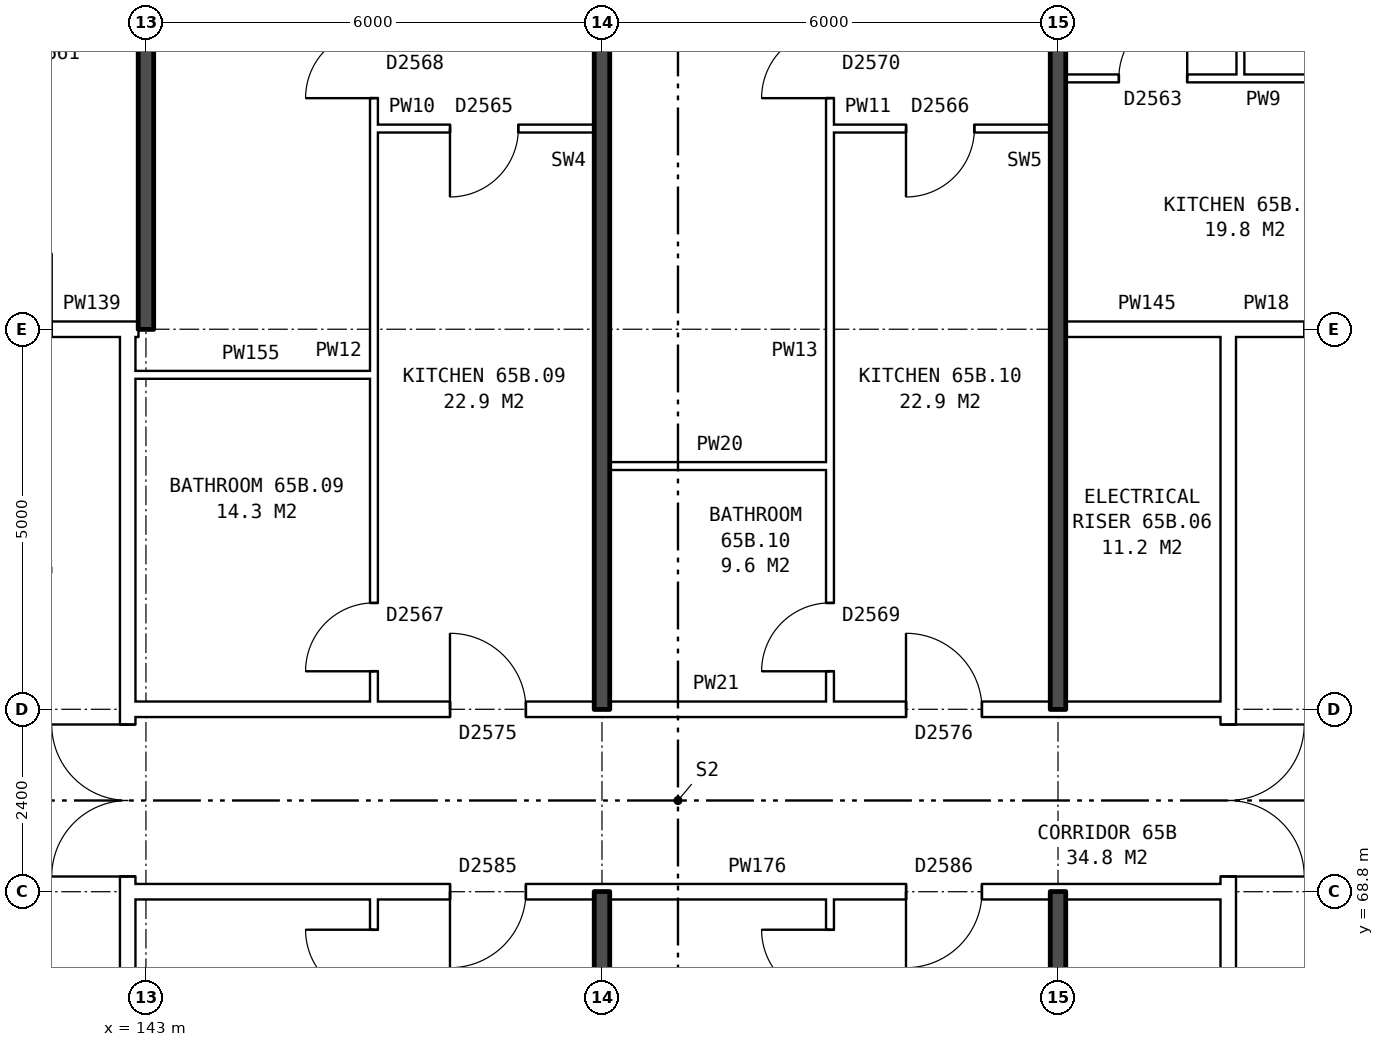
"""IFC4 building model, lengths in metres.
Left out: names, types, materials, properties, quantities, classifications, styles, units other than length and angle.
Written with IfcOpenShell. Run it as: python <this file> out.ifc"""

import sys

from ifc_helpers import new_model, si_unit, direction, frame, frame_2d, origin, place, context, subcontext, project, spatial, rectangle, extrude, element, fill, save


model = new_model("IFC4")
c1 = context("Model", 3, precision=1e-05, world=origin(), true_north=direction((0.0, 1.0)))
c2 = subcontext(c1, "Body", "Model", "MODEL_VIEW")
j1 = project(units=[si_unit("LENGTHUNIT", "METRE"), si_unit("PLANEANGLEUNIT", "RADIAN")], contexts=[c1])
p1 = place(None, origin())
s1 = spatial("IfcSite", under=j1, at=p1, CompositionType="ELEMENT")
p2 = place(p1, origin())
s2 = spatial("IfcBuilding", under=s1, at=p2, CompositionType="ELEMENT")
p3 = place(p2, frame((0.0, 0.0, 230.7)))
s3 = spatial("IfcBuildingStorey", under=s2, at=p3, CompositionType="ELEMENT", Elevation=230.7)
p4 = place(p3, frame((142.76, 63.9, 0.0), z_axis=(0.0, 0.0, 1.0), x_axis=(0.0, 1.0, 0.0)))
e1 = element("IfcWall", 1, at=p4, inside=s3, PredefinedType="PARTITIONING", context=c2, shape_type="SweptSolid", body=[
    extrude(rectangle(XDim=12.2, YDim=0.2, at=frame_2d((6.1, 0.0))), origin(), (0.0, 0.0, 1.0), 2.85),
])
p5 = place(p4, frame((5.1, 0.0, 0.0)))
e2 = element("IfcOpeningElement", 2, at=p5, cuts=e1, PredefinedType="OPENING", context=c2, shape_type="SweptSolid", body=[
    extrude(rectangle(XDim=2.0, YDim=2.1, at=frame_2d((1.0, 1.05))), frame((0.0, 0.11, 0.0), z_axis=(0.0, -1.0, 0.0), x_axis=(1.0, 0.0, 0.0)), (0.0, 0.0, 1.0), 0.22),
])
p6 = place(p3, frame((157.24, 63.9, 0.0), z_axis=(0.0, 0.0, 1.0), x_axis=(0.0, 1.0, 0.0)))
e3 = element("IfcWall", 3, at=p6, inside=s3, PredefinedType="PARTITIONING", context=c2, shape_type="SweptSolid", body=[
    extrude(rectangle(XDim=12.2, YDim=0.2, at=frame_2d((6.1, 0.0))), origin(), (0.0, 0.0, 1.0), 2.85),
])
p7 = place(p6, frame((5.1, 0.0, 0.0)))
e4 = element("IfcOpeningElement", 4, at=p7, cuts=e3, PredefinedType="OPENING", context=c2, shape_type="SweptSolid", body=[
    extrude(rectangle(XDim=2.0, YDim=2.1, at=frame_2d((1.0, 1.05))), frame((0.0, 0.11, 0.0), z_axis=(0.0, -1.0, 0.0), x_axis=(1.0, 0.0, 0.0)), (0.0, 0.0, 1.0), 0.22),
])
p8 = place(p3, frame((142.76, 68.8, 0.0), z_axis=(0.0, 0.0, 1.0), x_axis=(1.0, 0.0, 0.0)))
e5 = element("IfcWall", 5, at=p8, inside=s3, PredefinedType="PARTITIONING", context=c2, shape_type="SweptSolid", body=[
    extrude(rectangle(XDim=14.48, YDim=0.2, at=frame_2d((7.24, 0.0))), origin(), (0.0, 0.0, 1.0), 2.85),
])
p9 = place(p8, frame((4.24, 0.0, 0.0)))
e6 = element("IfcOpeningElement", 6, at=p9, cuts=e5, PredefinedType="OPENING", context=c2, shape_type="SweptSolid", body=[
    extrude(rectangle(XDim=1.0, YDim=2.1, at=frame_2d((0.5, 1.05))), frame((0.0, 0.11, 0.0), z_axis=(0.0, -1.0, 0.0), x_axis=(1.0, 0.0, 0.0)), (0.0, 0.0, 1.0), 0.22),
])
p10 = place(p8, frame((10.24, 0.0, 0.0)))
e7 = element("IfcOpeningElement", 7, at=p10, cuts=e5, PredefinedType="OPENING", context=c2, shape_type="SweptSolid", body=[
    extrude(rectangle(XDim=1.0, YDim=2.1, at=frame_2d((0.5, 1.05))), frame((0.0, 0.11, 0.0), z_axis=(0.0, -1.0, 0.0), x_axis=(1.0, 0.0, 0.0)), (0.0, 0.0, 1.0), 0.22),
])
p11 = place(p3, frame((142.76, 71.2, 0.0), z_axis=(0.0, 0.0, 1.0), x_axis=(1.0, 0.0, 0.0)))
e8 = element("IfcWall", 8, at=p11, inside=s3, PredefinedType="PARTITIONING", context=c2, shape_type="SweptSolid", body=[
    extrude(rectangle(XDim=14.48, YDim=0.2, at=frame_2d((7.24, 0.0))), origin(), (0.0, 0.0, 1.0), 2.85),
])
p12 = place(p11, frame((4.24, 0.0, 0.0)))
e9 = element("IfcOpeningElement", 9, at=p12, cuts=e8, PredefinedType="OPENING", context=c2, shape_type="SweptSolid", body=[
    extrude(rectangle(XDim=1.0, YDim=2.1, at=frame_2d((0.5, 1.05))), frame((0.0, 0.11, 0.0), z_axis=(0.0, -1.0, 0.0), x_axis=(1.0, 0.0, 0.0)), (0.0, 0.0, 1.0), 0.22),
])
p13 = place(p11, frame((10.24, 0.0, 0.0)))
e10 = element("IfcOpeningElement", 10, at=p13, cuts=e8, PredefinedType="OPENING", context=c2, shape_type="SweptSolid", body=[
    extrude(rectangle(XDim=1.0, YDim=2.1, at=frame_2d((0.5, 1.05))), frame((0.0, 0.11, 0.0), z_axis=(0.0, -1.0, 0.0), x_axis=(1.0, 0.0, 0.0)), (0.0, 0.0, 1.0), 0.22),
])
p14 = place(p3, frame((149.1, 74.4, 0.0), z_axis=(0.0, 0.0, 1.0), x_axis=(1.0, 0.0, 0.0)))
e11 = element("IfcWall", 11, at=p14, inside=s3, PredefinedType="PARTITIONING", context=c2, shape_type="SweptSolid", body=[
    extrude(rectangle(XDim=2.9, YDim=0.1, at=frame_2d((1.45, 0.0))), origin(), (0.0, 0.0, 1.0), 2.85),
])
p15 = place(p3, frame((142.76, 75.6, 0.0), z_axis=(0.0, 0.0, 1.0), x_axis=(1.0, 0.0, 0.0)))
e12 = element("IfcWall", 12, at=p15, inside=s3, PredefinedType="PARTITIONING", context=c2, shape_type="SweptSolid", body=[
    extrude(rectangle(XDim=3.24, YDim=0.1, at=frame_2d((1.62, 0.0))), origin(), (0.0, 0.0, 1.0), 2.85),
])
p16 = place(p3, frame((139.76, 76.2, 0.0), z_axis=(0.0, 0.0, 1.0), x_axis=(1.0, 0.0, 0.0)))
e13 = element("IfcWall", 13, at=p16, inside=s3, PredefinedType="PARTITIONING", context=c2, shape_type="SweptSolid", body=[
    extrude(rectangle(XDim=3.0, YDim=0.2, at=frame_2d((1.5, 0.0))), origin(), (0.0, 0.0, 1.0), 2.85),
])
p17 = place(p16, frame((1.0, 0.0, 0.0)))
e14 = element("IfcOpeningElement", 14, at=p17, cuts=e13, PredefinedType="OPENING", context=c2, shape_type="SweptSolid", body=[
    extrude(rectangle(XDim=1.0, YDim=2.1, at=frame_2d((0.5, 1.05))), frame((0.0, 0.11, 0.0), z_axis=(0.0, -1.0, 0.0), x_axis=(1.0, 0.0, 0.0)), (0.0, 0.0, 1.0), 0.22),
])
p18 = place(p3, frame((142.76, 76.2, 0.0), z_axis=(0.0, 0.0, 1.0), x_axis=(1.0, 0.0, 0.0)))
e15 = element("IfcWall", 15, at=p18, inside=s3, PredefinedType="PARTITIONING", context=c2, shape_type="SweptSolid", body=[
    extrude(rectangle(XDim=0.14, YDim=0.2, at=frame_2d((0.07, 0.0))), origin(), (0.0, 0.0, 1.0), 2.85),
])
p19 = place(p3, frame((155.1, 76.2, 0.0), z_axis=(0.0, 0.0, 1.0), x_axis=(1.0, 0.0, 0.0)))
e16 = element("IfcWall", 16, at=p19, inside=s3, PredefinedType="PARTITIONING", context=c2, shape_type="SweptSolid", body=[
    extrude(rectangle(XDim=2.14, YDim=0.2, at=frame_2d((1.07, 0.0))), origin(), (0.0, 0.0, 1.0), 2.85),
])
p20 = place(p3, frame((157.24, 76.2, 0.0), z_axis=(0.0, 0.0, 1.0), x_axis=(1.0, 0.0, 0.0)))
e17 = element("IfcWall", 17, at=p20, inside=s3, PredefinedType="PARTITIONING", context=c2, shape_type="SweptSolid", body=[
    extrude(rectangle(XDim=3.0, YDim=0.2, at=frame_2d((1.5, 0.0))), origin(), (0.0, 0.0, 1.0), 2.85),
])
p21 = place(p20, frame((1.0, 0.0, 0.0)))
e18 = element("IfcOpeningElement", 18, at=p21, cuts=e17, PredefinedType="OPENING", context=c2, shape_type="SweptSolid", body=[
    extrude(rectangle(XDim=1.0, YDim=2.1, at=frame_2d((0.5, 1.05))), frame((0.0, 0.11, 0.0), z_axis=(0.0, -1.0, 0.0), x_axis=(1.0, 0.0, 0.0)), (0.0, 0.0, 1.0), 0.22),
])
p22 = place(p3, frame((146.0, 78.84, 0.0), z_axis=(0.0, 0.0, 1.0), x_axis=(1.0, 0.0, 0.0)))
e19 = element("IfcWall", 19, at=p22, inside=s3, PredefinedType="PARTITIONING", context=c2, shape_type="SweptSolid", body=[
    extrude(rectangle(XDim=2.9, YDim=0.1, at=frame_2d((1.45, 0.0))), origin(), (0.0, 0.0, 1.0), 2.85),
])
p23 = place(p22, frame((1.0, 0.0, 0.0)))
e20 = element("IfcOpeningElement", 20, at=p23, cuts=e19, PredefinedType="OPENING", context=c2, shape_type="SweptSolid", body=[
    extrude(rectangle(XDim=0.9, YDim=2.1, at=frame_2d((0.45, 1.05))), frame((0.0, 0.06, 0.0), z_axis=(0.0, -1.0, 0.0), x_axis=(1.0, 0.0, 0.0)), (0.0, 0.0, 1.0), 0.12),
])
p24 = place(p3, frame((152.0, 78.84, 0.0), z_axis=(0.0, 0.0, 1.0), x_axis=(1.0, 0.0, 0.0)))
e21 = element("IfcWall", 21, at=p24, inside=s3, PredefinedType="PARTITIONING", context=c2, shape_type="SweptSolid", body=[
    extrude(rectangle(XDim=2.9, YDim=0.1, at=frame_2d((1.45, 0.0))), origin(), (0.0, 0.0, 1.0), 2.85),
])
p25 = place(p24, frame((1.0, 0.0, 0.0)))
e22 = element("IfcOpeningElement", 22, at=p25, cuts=e21, PredefinedType="OPENING", context=c2, shape_type="SweptSolid", body=[
    extrude(rectangle(XDim=0.9, YDim=2.1, at=frame_2d((0.45, 1.05))), frame((0.0, 0.06, 0.0), z_axis=(0.0, -1.0, 0.0), x_axis=(1.0, 0.0, 0.0)), (0.0, 0.0, 1.0), 0.12),
])
p26 = place(p3, frame((155.1, 79.5, 0.0), z_axis=(0.0, 0.0, 1.0), x_axis=(1.0, 0.0, 0.0)))
e23 = element("IfcWall", 23, at=p26, inside=s3, PredefinedType="PARTITIONING", context=c2, shape_type="SweptSolid", body=[
    extrude(rectangle(XDim=5.8, YDim=0.1, at=frame_2d((2.9, 0.0))), origin(), (0.0, 0.0, 1.0), 2.85),
])
p27 = place(p26, frame((3.6, 0.0, 0.0)))
e24 = element("IfcOpeningElement", 24, at=p27, cuts=e23, PredefinedType="OPENING", context=c2, shape_type="SweptSolid", body=[
    extrude(rectangle(XDim=0.9, YDim=2.1, at=frame_2d((0.45, 1.05))), frame((0.0, 0.06, 0.0), z_axis=(0.0, -1.0, 0.0), x_axis=(1.0, 0.0, 0.0)), (0.0, 0.0, 1.0), 0.12),
])
p28 = place(p26, frame((0.7, 0.0, 0.0)))
e25 = element("IfcOpeningElement", 25, at=p28, cuts=e23, PredefinedType="OPENING", context=c2, shape_type="SweptSolid", body=[
    extrude(rectangle(XDim=0.9, YDim=2.1, at=frame_2d((0.45, 1.05))), frame((0.0, 0.06, 0.0), z_axis=(0.0, -1.0, 0.0), x_axis=(1.0, 0.0, 0.0)), (0.0, 0.0, 1.0), 0.12),
])
p29 = place(p3, frame((143.0, 76.2, 0.0), z_axis=(0.0, 0.0, 1.0), x_axis=(0.0, 1.0, 0.0)))
e26 = element("IfcWall", 26, at=p29, inside=s3, PredefinedType="SOLIDWALL", context=c2, shape_type="SweptSolid", body=[
    extrude(rectangle(XDim=9.44, YDim=0.2, at=frame_2d((4.72, 0.0))), origin(), (0.0, 0.0, 1.0), 2.85),
])
p30 = place(p3, frame((146.0, 54.36, 0.0), z_axis=(0.0, 0.0, 1.0), x_axis=(0.0, 1.0, 0.0)))
e27 = element("IfcWall", 27, at=p30, inside=s3, PredefinedType="PARTITIONING", context=c2, shape_type="SweptSolid", body=[
    extrude(rectangle(XDim=14.34, YDim=0.1, at=frame_2d((7.17, 0.0))), origin(), (0.0, 0.0, 1.0), 2.85),
])
p31 = place(p30, frame((7.7, 0.0, 0.0)))
e28 = element("IfcOpeningElement", 28, at=p31, cuts=e27, PredefinedType="OPENING", context=c2, shape_type="SweptSolid", body=[
    extrude(rectangle(XDim=0.9, YDim=2.1, at=frame_2d((0.45, 1.05))), frame((0.0, 0.06, 0.0), z_axis=(0.0, -1.0, 0.0), x_axis=(1.0, 0.0, 0.0)), (0.0, 0.0, 1.0), 0.12),
])
p32 = place(p30, frame((13.04, 0.0, 0.0)))
e29 = element("IfcOpeningElement", 29, at=p32, cuts=e27, PredefinedType="OPENING", context=c2, shape_type="SweptSolid", body=[
    extrude(rectangle(XDim=0.9, YDim=2.1, at=frame_2d((0.45, 1.05))), frame((0.0, 0.06, 0.0), z_axis=(0.0, -1.0, 0.0), x_axis=(1.0, 0.0, 0.0)), (0.0, 0.0, 1.0), 0.12),
])
p33 = place(p3, frame((146.0, 71.3, 0.0), z_axis=(0.0, 0.0, 1.0), x_axis=(0.0, 1.0, 0.0)))
e30 = element("IfcWall", 30, at=p33, inside=s3, PredefinedType="PARTITIONING", context=c2, shape_type="SweptSolid", body=[
    extrude(rectangle(XDim=14.34, YDim=0.1, at=frame_2d((7.17, 0.0))), origin(), (0.0, 0.0, 1.0), 2.85),
])
p34 = place(p33, frame((7.94, 0.0, 0.0)))
e31 = element("IfcOpeningElement", 31, at=p34, cuts=e30, PredefinedType="OPENING", context=c2, shape_type="SweptSolid", body=[
    extrude(rectangle(XDim=0.9, YDim=2.1, at=frame_2d((0.45, 1.05))), frame((0.0, 0.06, 0.0), z_axis=(0.0, -1.0, 0.0), x_axis=(1.0, 0.0, 0.0)), (0.0, 0.0, 1.0), 0.12),
])
p35 = place(p33, frame((0.4, 0.0, 0.0)))
e32 = element("IfcOpeningElement", 32, at=p35, cuts=e30, PredefinedType="OPENING", context=c2, shape_type="SweptSolid", body=[
    extrude(rectangle(XDim=0.9, YDim=2.1, at=frame_2d((0.45, 1.05))), frame((0.0, 0.06, 0.0), z_axis=(0.0, -1.0, 0.0), x_axis=(1.0, 0.0, 0.0)), (0.0, 0.0, 1.0), 0.12),
])
for number, where, z_axis, x_axis in (
    (33, (149.0, 54.36, 0.0), (0.0, 0.0, 1.0), (0.0, 1.0, 0.0)),
    (34, (149.0, 71.2, 0.0), (0.0, 0.0, 1.0), (0.0, 1.0, 0.0)),
):
    element("IfcWall", number, at=place(p3, frame(where, z_axis=z_axis, x_axis=x_axis)), inside=s3, PredefinedType="SOLIDWALL", context=c2, shape_type="SweptSolid", body=[
        extrude(rectangle(XDim=14.44, YDim=0.2, at=frame_2d((7.22, 0.0))), origin(), (0.0, 0.0, 1.0), 2.85),
    ])
p36 = place(p3, frame((152.0, 54.36, 0.0), z_axis=(0.0, 0.0, 1.0), x_axis=(0.0, 1.0, 0.0)))
e35 = element("IfcWall", 35, at=p36, inside=s3, PredefinedType="PARTITIONING", context=c2, shape_type="SweptSolid", body=[
    extrude(rectangle(XDim=14.34, YDim=0.1, at=frame_2d((7.17, 0.0))), origin(), (0.0, 0.0, 1.0), 2.85),
])
p37 = place(p36, frame((4.2, 0.0, 0.0)))
e36 = element("IfcOpeningElement", 36, at=p37, cuts=e35, PredefinedType="OPENING", context=c2, shape_type="SweptSolid", body=[
    extrude(rectangle(XDim=0.9, YDim=2.1, at=frame_2d((0.45, 1.05))), frame((0.0, 0.06, 0.0), z_axis=(0.0, -1.0, 0.0), x_axis=(1.0, 0.0, 0.0)), (0.0, 0.0, 1.0), 0.12),
])
p38 = place(p36, frame((13.04, 0.0, 0.0)))
e37 = element("IfcOpeningElement", 37, at=p38, cuts=e35, PredefinedType="OPENING", context=c2, shape_type="SweptSolid", body=[
    extrude(rectangle(XDim=0.9, YDim=2.1, at=frame_2d((0.45, 1.05))), frame((0.0, 0.06, 0.0), z_axis=(0.0, -1.0, 0.0), x_axis=(1.0, 0.0, 0.0)), (0.0, 0.0, 1.0), 0.12),
])
p39 = place(p3, frame((152.0, 71.3, 0.0), z_axis=(0.0, 0.0, 1.0), x_axis=(0.0, 1.0, 0.0)))
e38 = element("IfcWall", 38, at=p39, inside=s3, PredefinedType="PARTITIONING", context=c2, shape_type="SweptSolid", body=[
    extrude(rectangle(XDim=14.34, YDim=0.1, at=frame_2d((7.17, 0.0))), origin(), (0.0, 0.0, 1.0), 2.85),
])
p40 = place(p39, frame((7.94, 0.0, 0.0)))
e39 = element("IfcOpeningElement", 39, at=p40, cuts=e38, PredefinedType="OPENING", context=c2, shape_type="SweptSolid", body=[
    extrude(rectangle(XDim=0.9, YDim=2.1, at=frame_2d((0.45, 1.05))), frame((0.0, 0.06, 0.0), z_axis=(0.0, -1.0, 0.0), x_axis=(1.0, 0.0, 0.0)), (0.0, 0.0, 1.0), 0.12),
])
p41 = place(p39, frame((0.4, 0.0, 0.0)))
e40 = element("IfcOpeningElement", 40, at=p41, cuts=e38, PredefinedType="OPENING", context=c2, shape_type="SweptSolid", body=[
    extrude(rectangle(XDim=0.9, YDim=2.1, at=frame_2d((0.45, 1.05))), frame((0.0, 0.06, 0.0), z_axis=(0.0, -1.0, 0.0), x_axis=(1.0, 0.0, 0.0)), (0.0, 0.0, 1.0), 0.12),
])
for number, where, z_axis, x_axis in (
    (41, (155.0, 54.36, 0.0), (0.0, 0.0, 1.0), (0.0, 1.0, 0.0)),
    (42, (155.0, 71.2, 0.0), (0.0, 0.0, 1.0), (0.0, 1.0, 0.0)),
):
    element("IfcWall", number, at=place(p3, frame(where, z_axis=z_axis, x_axis=x_axis)), inside=s3, PredefinedType="SOLIDWALL", context=c2, shape_type="SweptSolid", body=[
        extrude(rectangle(XDim=14.44, YDim=0.2, at=frame_2d((7.22, 0.0))), origin(), (0.0, 0.0, 1.0), 2.85),
    ])
p42 = place(p3, frame((157.4, 79.55, 0.0), z_axis=(0.0, 0.0, 1.0), x_axis=(0.0, 1.0, 0.0)))
e43 = element("IfcWall", 43, at=p42, inside=s3, PredefinedType="PARTITIONING", context=c2, shape_type="SweptSolid", body=[
    extrude(rectangle(XDim=2.7, YDim=0.1, at=frame_2d((1.35, 0.0))), origin(), (0.0, 0.0, 1.0), 2.85),
])
p43 = place(p5, origin())
e44 = element("IfcDoor", 44, at=p43, inside=s3, OperationType="DOUBLE_DOOR_SINGLE_SWING", PredefinedType="DOOR", context=c2, shape_type="SweptSolid", body=[
    extrude(rectangle(XDim=2.0, YDim=2.1, at=frame_2d((1.0, 1.05))), frame((0.0, 0.025, 0.0), z_axis=(0.0, -1.0, 0.0), x_axis=(1.0, 0.0, 0.0)), (0.0, 0.0, 1.0), 0.05),
])
fill(e2, e44)
p44 = place(p7, frame((2.0, 0.0, 0.0), z_axis=(0.0, 0.0, 1.0), x_axis=(-1.0, 0.0, 0.0)))
e45 = element("IfcDoor", 45, at=p44, inside=s3, OperationType="DOUBLE_DOOR_SINGLE_SWING", PredefinedType="DOOR", context=c2, shape_type="SweptSolid", body=[
    extrude(rectangle(XDim=2.0, YDim=2.1, at=frame_2d((1.0, 1.05))), frame((0.0, 0.025, 0.0), z_axis=(0.0, -1.0, 0.0), x_axis=(1.0, 0.0, 0.0)), (0.0, 0.0, 1.0), 0.05),
])
fill(e4, e45)
p45 = place(p28, origin())
e46 = element("IfcDoor", 46, at=p45, inside=s3, OperationType="SINGLE_SWING_RIGHT", PredefinedType="DOOR", context=c2, shape_type="SweptSolid", body=[
    extrude(rectangle(XDim=0.9, YDim=2.1, at=frame_2d((0.45, 1.05))), frame((0.0, 0.025, 0.0), z_axis=(0.0, -1.0, 0.0), x_axis=(1.0, 0.0, 0.0)), (0.0, 0.0, 1.0), 0.05),
])
fill(e25, e46)
p46 = place(p9, frame((1.0, 0.0, 0.0), z_axis=(0.0, 0.0, 1.0), x_axis=(-1.0, 0.0, 0.0)))
e47 = element("IfcDoor", 47, at=p46, inside=s3, OperationType="SINGLE_SWING_RIGHT", PredefinedType="DOOR", context=c2, shape_type="SweptSolid", body=[
    extrude(rectangle(XDim=1.0, YDim=2.1, at=frame_2d((0.5, 1.05))), frame((0.0, 0.025, 0.0), z_axis=(0.0, -1.0, 0.0), x_axis=(1.0, 0.0, 0.0)), (0.0, 0.0, 1.0), 0.05),
])
fill(e6, e47)
p47 = place(p32, origin())
e48 = element("IfcDoor", 48, at=p47, inside=s3, OperationType="SINGLE_SWING_RIGHT", PredefinedType="DOOR", context=c2, shape_type="SweptSolid", body=[
    extrude(rectangle(XDim=0.9, YDim=2.1, at=frame_2d((0.45, 1.05))), frame((0.0, 0.025, 0.0), z_axis=(0.0, -1.0, 0.0), x_axis=(1.0, 0.0, 0.0)), (0.0, 0.0, 1.0), 0.05),
])
fill(e29, e48)
p48 = place(p10, frame((1.0, 0.0, 0.0), z_axis=(0.0, 0.0, 1.0), x_axis=(-1.0, 0.0, 0.0)))
e49 = element("IfcDoor", 49, at=p48, inside=s3, OperationType="SINGLE_SWING_RIGHT", PredefinedType="DOOR", context=c2, shape_type="SweptSolid", body=[
    extrude(rectangle(XDim=1.0, YDim=2.1, at=frame_2d((0.5, 1.05))), frame((0.0, 0.025, 0.0), z_axis=(0.0, -1.0, 0.0), x_axis=(1.0, 0.0, 0.0)), (0.0, 0.0, 1.0), 0.05),
])
fill(e7, e49)
p49 = place(p38, origin())
e50 = element("IfcDoor", 50, at=p49, inside=s3, OperationType="SINGLE_SWING_RIGHT", PredefinedType="DOOR", context=c2, shape_type="SweptSolid", body=[
    extrude(rectangle(XDim=0.9, YDim=2.1, at=frame_2d((0.45, 1.05))), frame((0.0, 0.025, 0.0), z_axis=(0.0, -1.0, 0.0), x_axis=(1.0, 0.0, 0.0)), (0.0, 0.0, 1.0), 0.05),
])
fill(e37, e50)
p50 = place(p34, origin())
e51 = element("IfcDoor", 51, at=p50, inside=s3, OperationType="SINGLE_SWING_LEFT", PredefinedType="DOOR", context=c2, shape_type="SweptSolid", body=[
    extrude(rectangle(XDim=0.9, YDim=2.1, at=frame_2d((0.45, 1.05))), frame((0.0, 0.025, 0.0), z_axis=(0.0, -1.0, 0.0), x_axis=(1.0, 0.0, 0.0)), (0.0, 0.0, 1.0), 0.05),
])
fill(e31, e51)
p51 = place(p12, origin())
e52 = element("IfcDoor", 52, at=p51, inside=s3, OperationType="SINGLE_SWING_LEFT", PredefinedType="DOOR", context=c2, shape_type="SweptSolid", body=[
    extrude(rectangle(XDim=1.0, YDim=2.1, at=frame_2d((0.5, 1.05))), frame((0.0, 0.025, 0.0), z_axis=(0.0, -1.0, 0.0), x_axis=(1.0, 0.0, 0.0)), (0.0, 0.0, 1.0), 0.05),
])
fill(e9, e52)
p52 = place(p23, frame((0.9, 0.0, 0.0), z_axis=(0.0, 0.0, 1.0), x_axis=(-1.0, 0.0, 0.0)))
e53 = element("IfcDoor", 53, at=p52, inside=s3, OperationType="SINGLE_SWING_RIGHT", PredefinedType="DOOR", context=c2, shape_type="SweptSolid", body=[
    extrude(rectangle(XDim=0.9, YDim=2.1, at=frame_2d((0.45, 1.05))), frame((0.0, 0.025, 0.0), z_axis=(0.0, -1.0, 0.0), x_axis=(1.0, 0.0, 0.0)), (0.0, 0.0, 1.0), 0.05),
])
fill(e20, e53)
p53 = place(p35, origin())
e54 = element("IfcDoor", 54, at=p53, inside=s3, OperationType="SINGLE_SWING_LEFT", PredefinedType="DOOR", context=c2, shape_type="SweptSolid", body=[
    extrude(rectangle(XDim=0.9, YDim=2.1, at=frame_2d((0.45, 1.05))), frame((0.0, 0.025, 0.0), z_axis=(0.0, -1.0, 0.0), x_axis=(1.0, 0.0, 0.0)), (0.0, 0.0, 1.0), 0.05),
])
fill(e32, e54)
p54 = place(p40, origin())
e55 = element("IfcDoor", 55, at=p54, inside=s3, OperationType="SINGLE_SWING_LEFT", PredefinedType="DOOR", context=c2, shape_type="SweptSolid", body=[
    extrude(rectangle(XDim=0.9, YDim=2.1, at=frame_2d((0.45, 1.05))), frame((0.0, 0.025, 0.0), z_axis=(0.0, -1.0, 0.0), x_axis=(1.0, 0.0, 0.0)), (0.0, 0.0, 1.0), 0.05),
])
fill(e39, e55)
p55 = place(p13, origin())
e56 = element("IfcDoor", 56, at=p55, inside=s3, OperationType="SINGLE_SWING_LEFT", PredefinedType="DOOR", context=c2, shape_type="SweptSolid", body=[
    extrude(rectangle(XDim=1.0, YDim=2.1, at=frame_2d((0.5, 1.05))), frame((0.0, 0.025, 0.0), z_axis=(0.0, -1.0, 0.0), x_axis=(1.0, 0.0, 0.0)), (0.0, 0.0, 1.0), 0.05),
])
fill(e10, e56)
p56 = place(p25, frame((0.9, 0.0, 0.0), z_axis=(0.0, 0.0, 1.0), x_axis=(-1.0, 0.0, 0.0)))
e57 = element("IfcDoor", 57, at=p56, inside=s3, OperationType="SINGLE_SWING_RIGHT", PredefinedType="DOOR", context=c2, shape_type="SweptSolid", body=[
    extrude(rectangle(XDim=0.9, YDim=2.1, at=frame_2d((0.45, 1.05))), frame((0.0, 0.025, 0.0), z_axis=(0.0, -1.0, 0.0), x_axis=(1.0, 0.0, 0.0)), (0.0, 0.0, 1.0), 0.05),
])
fill(e22, e57)
p57 = place(p41, origin())
e58 = element("IfcDoor", 58, at=p57, inside=s3, OperationType="SINGLE_SWING_LEFT", PredefinedType="DOOR", context=c2, shape_type="SweptSolid", body=[
    extrude(rectangle(XDim=0.9, YDim=2.1, at=frame_2d((0.45, 1.05))), frame((0.0, 0.025, 0.0), z_axis=(0.0, -1.0, 0.0), x_axis=(1.0, 0.0, 0.0)), (0.0, 0.0, 1.0), 0.05),
])
fill(e40, e58)
save(model, sys.argv[1])
